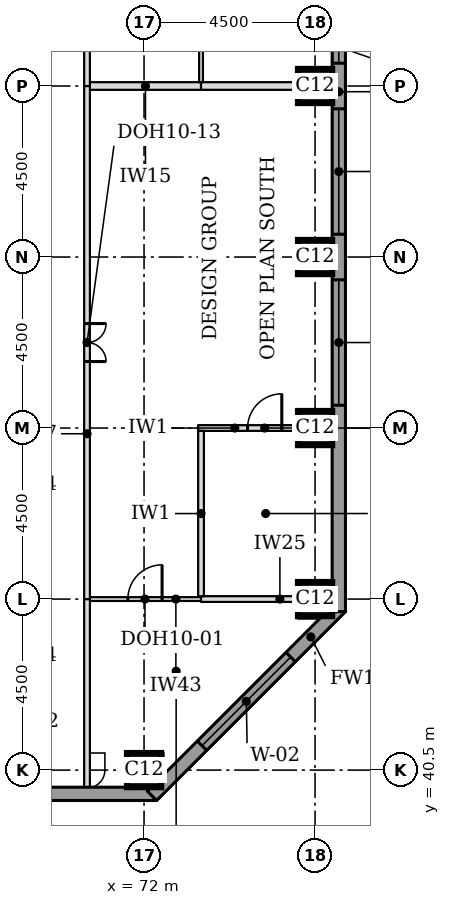
"""IFC4 building model, lengths in metres.
Left out: names, types, materials, properties, quantities, classifications, styles, units other than length and angle.
Written with IfcOpenShell. Run it as: python <this file> out.ifc"""

import sys

from ifc_helpers import new_model, si_unit, direction, frame, frame_2d, origin, origin_2d, place, context, subcontext, project, spatial, rectangle, extrude, element, fill, save


model = new_model("IFC4")
c1 = context("Model", 3, precision=1e-05, world=origin(), true_north=direction((0.0, 1.0)))
c2 = subcontext(c1, "Body", "Model", "MODEL_VIEW")
j1 = project(units=[si_unit("LENGTHUNIT", "METRE"), si_unit("PLANEANGLEUNIT", "RADIAN")], contexts=[c1])
p1 = place(None, origin())
s1 = spatial("IfcSite", under=j1, at=p1, CompositionType="ELEMENT")
p2 = place(p1, origin())
s2 = spatial("IfcBuilding", under=s1, at=p2, CompositionType="ELEMENT")
p3 = place(p2, frame((0.0, 0.0, 226.7)))
s3 = spatial("IfcBuildingStorey", under=s2, at=p3, CompositionType="ELEMENT", Elevation=226.7)
for number, where, z_axis, x_axis in (
    (1, (72.0, 40.5, 0.0), (0.0, 0.0, 1.0), (1.0, 0.0, 0.0)),
    (2, (76.5, 45.0, 0.0), (0.0, 0.0, 1.0), (1.0, 0.0, 0.0)),
    (3, (76.5, 49.5, 0.0), (0.0, 0.0, 1.0), (1.0, 0.0, 0.0)),
    (4, (76.5, 54.0, 0.0), (0.0, 0.0, 1.0), (1.0, 0.0, 0.0)),
    (5, (76.5, 58.5, 0.0), (0.0, 0.0, 1.0), (1.0, 0.0, 0.0)),
):
    element("IfcColumn", number, at=place(p3, frame(where, z_axis=z_axis, x_axis=x_axis)), inside=s3, PredefinedType="COLUMN", context=c2, shape_type="SweptSolid", body=[
        extrude(rectangle(XDim=0.9, YDim=0.9, at=origin_2d()), origin(), (0.0, 0.0, 1.0), 3.7),
    ])
p4 = place(p3, frame((36.0, 39.875, 0.0), z_axis=(0.0, 0.0, 1.0), x_axis=(1.0, 0.0, 0.0)))
e6 = element("IfcWall", 6, at=p4, inside=s3, PredefinedType="STANDARD", context=c2, shape_type="SweptSolid", body=[
    extrude(rectangle(XDim=36.331, YDim=0.35, at=frame_2d((18.166, 0.0))), origin(), (0.0, 0.0, 1.0), 3.525),
])
p5 = place(p4, frame((5.1, 0.0, 0.9)))
e7 = element("IfcOpeningElement", 7, at=p5, cuts=e6, PredefinedType="OPENING", context=c2, shape_type="SweptSolid", body=[
    extrude(rectangle(XDim=3.3, YDim=1.9, at=frame_2d((1.65, 0.95))), frame((0.0, 0.185, 0.0), z_axis=(0.0, -1.0, 0.0), x_axis=(1.0, 0.0, 0.0)), (0.0, 0.0, 1.0), 0.37),
])
p6 = place(p4, frame((9.6, 0.0, 0.9)))
e8 = element("IfcOpeningElement", 8, at=p6, cuts=e6, PredefinedType="OPENING", context=c2, shape_type="SweptSolid", body=[
    extrude(rectangle(XDim=3.3, YDim=1.9, at=frame_2d((1.65, 0.95))), frame((0.0, 0.185, 0.0), z_axis=(0.0, -1.0, 0.0), x_axis=(1.0, 0.0, 0.0)), (0.0, 0.0, 1.0), 0.37),
])
p7 = place(p4, frame((14.1, 0.0, 0.9)))
e9 = element("IfcOpeningElement", 9, at=p7, cuts=e6, PredefinedType="OPENING", context=c2, shape_type="SweptSolid", body=[
    extrude(rectangle(XDim=3.3, YDim=1.9, at=frame_2d((1.65, 0.95))), frame((0.0, 0.185, 0.0), z_axis=(0.0, -1.0, 0.0), x_axis=(1.0, 0.0, 0.0)), (0.0, 0.0, 1.0), 0.37),
])
p8 = place(p4, frame((18.6, 0.0, 0.9)))
e10 = element("IfcOpeningElement", 10, at=p8, cuts=e6, PredefinedType="OPENING", context=c2, shape_type="SweptSolid", body=[
    extrude(rectangle(XDim=3.3, YDim=1.9, at=frame_2d((1.65, 0.95))), frame((0.0, 0.185, 0.0), z_axis=(0.0, -1.0, 0.0), x_axis=(1.0, 0.0, 0.0)), (0.0, 0.0, 1.0), 0.37),
])
p9 = place(p4, frame((23.1, 0.0, 0.9)))
e11 = element("IfcOpeningElement", 11, at=p9, cuts=e6, PredefinedType="OPENING", context=c2, shape_type="SweptSolid", body=[
    extrude(rectangle(XDim=3.3, YDim=1.9, at=frame_2d((1.65, 0.95))), frame((0.0, 0.185, 0.0), z_axis=(0.0, -1.0, 0.0), x_axis=(1.0, 0.0, 0.0)), (0.0, 0.0, 1.0), 0.37),
])
p10 = place(p4, frame((27.6, 0.0, 0.9)))
e12 = element("IfcOpeningElement", 12, at=p10, cuts=e6, PredefinedType="OPENING", context=c2, shape_type="SweptSolid", body=[
    extrude(rectangle(XDim=3.3, YDim=1.9, at=frame_2d((1.65, 0.95))), frame((0.0, 0.185, 0.0), z_axis=(0.0, -1.0, 0.0), x_axis=(1.0, 0.0, 0.0)), (0.0, 0.0, 1.0), 0.37),
])
p11 = place(p3, frame((72.208, 39.824, 0.0), z_axis=(0.0, 0.0, 1.0), x_axis=(0.707106781187, 0.707106781187, 0.0)))
e13 = element("IfcWall", 13, at=p11, inside=s3, PredefinedType="STANDARD", context=c2, shape_type="SweptSolid", body=[
    extrude(rectangle(XDim=7.027, YDim=0.35, at=frame_2d((3.513, 0.0))), origin(), (0.0, 0.0, 1.0), 3.525),
])
p12 = place(p11, frame((1.863, 0.0, 0.9)))
e14 = element("IfcOpeningElement", 14, at=p12, cuts=e13, PredefinedType="OPENING", context=c2, shape_type="SweptSolid", body=[
    extrude(rectangle(XDim=3.3, YDim=1.9, at=frame_2d((1.65, 0.95))), frame((0.0, 0.185, 0.0), z_axis=(0.0, -1.0, 0.0), x_axis=(1.0, 0.0, 0.0)), (0.0, 0.0, 1.0), 0.37),
])
p13 = place(p3, frame((77.125, 44.669, 0.0), z_axis=(0.0, 0.0, 1.0), x_axis=(0.0, 1.0, 0.0)))
e15 = element("IfcWall", 15, at=p13, inside=s3, PredefinedType="STANDARD", context=c2, shape_type="SweptSolid", body=[
    extrude(rectangle(XDim=32.163, YDim=0.35, at=frame_2d((16.081, 0.0))), origin(), (0.0, 0.0, 1.0), 3.525),
])
p14 = place(p13, frame((5.431, 0.0, 0.9)))
e16 = element("IfcOpeningElement", 16, at=p14, cuts=e15, PredefinedType="OPENING", context=c2, shape_type="SweptSolid", body=[
    extrude(rectangle(XDim=3.3, YDim=1.9, at=frame_2d((1.65, 0.95))), frame((0.0, 0.185, 0.0), z_axis=(0.0, -1.0, 0.0), x_axis=(1.0, 0.0, 0.0)), (0.0, 0.0, 1.0), 0.37),
])
p15 = place(p13, frame((9.931, 0.0, 0.9)))
e17 = element("IfcOpeningElement", 17, at=p15, cuts=e15, PredefinedType="OPENING", context=c2, shape_type="SweptSolid", body=[
    extrude(rectangle(XDim=3.3, YDim=1.9, at=frame_2d((1.65, 0.95))), frame((0.0, 0.185, 0.0), z_axis=(0.0, -1.0, 0.0), x_axis=(1.0, 0.0, 0.0)), (0.0, 0.0, 1.0), 0.37),
])
p16 = place(p13, frame((14.431, 0.0, 0.9)))
e18 = element("IfcOpeningElement", 18, at=p16, cuts=e15, PredefinedType="OPENING", context=c2, shape_type="SweptSolid", body=[
    extrude(rectangle(XDim=3.3, YDim=1.9, at=frame_2d((1.65, 0.95))), frame((0.0, 0.185, 0.0), z_axis=(0.0, -1.0, 0.0), x_axis=(1.0, 0.0, 0.0)), (0.0, 0.0, 1.0), 0.37),
])
p17 = place(p13, frame((18.931, 0.0, 0.9)))
e19 = element("IfcOpeningElement", 19, at=p17, cuts=e15, PredefinedType="OPENING", context=c2, shape_type="SweptSolid", body=[
    extrude(rectangle(XDim=3.3, YDim=1.9, at=frame_2d((1.65, 0.95))), frame((0.0, 0.185, 0.0), z_axis=(0.0, -1.0, 0.0), x_axis=(1.0, 0.0, 0.0)), (0.0, 0.0, 1.0), 0.37),
])
p18 = place(p13, frame((23.431, 0.0, 0.9)))
e20 = element("IfcOpeningElement", 20, at=p18, cuts=e15, PredefinedType="OPENING", context=c2, shape_type="SweptSolid", body=[
    extrude(rectangle(XDim=3.3, YDim=1.9, at=frame_2d((1.65, 0.95))), frame((0.0, 0.185, 0.0), z_axis=(0.0, -1.0, 0.0), x_axis=(1.0, 0.0, 0.0)), (0.0, 0.0, 1.0), 0.37),
])
p19 = place(p3, frame((70.575, 45.0, 0.0), z_axis=(0.0, 0.0, 1.0), x_axis=(1.0, 0.0, 0.0)))
e21 = element("IfcWall", 21, at=p19, inside=s3, PredefinedType="PARTITIONING", context=c2, shape_type="SweptSolid", body=[
    extrude(rectangle(XDim=2.925, YDim=0.1, at=frame_2d((1.462, 0.0))), origin(), (0.0, 0.0, 1.0), 3.096),
])
p20 = place(p19, frame((1.0, 0.0, 0.0)))
e22 = element("IfcOpeningElement", 22, at=p20, cuts=e21, PredefinedType="OPENING", context=c2, shape_type="SweptSolid", body=[
    extrude(rectangle(XDim=0.9, YDim=2.1, at=frame_2d((0.45, 1.05))), frame((0.0, 0.06, 0.0), z_axis=(0.0, -1.0, 0.0), x_axis=(1.0, 0.0, 0.0)), (0.0, 0.0, 1.0), 0.12),
])
p21 = place(p3, frame((73.5, 45.0, 0.0), z_axis=(0.0, 0.0, 1.0), x_axis=(1.0, 0.0, 0.0)))
e23 = element("IfcWall", 23, at=p21, inside=s3, PredefinedType="PARTITIONING", context=c2, shape_type="SweptSolid", body=[
    extrude(rectangle(XDim=2.55, YDim=0.15, at=frame_2d((1.275, 0.0))), origin(), (0.0, 0.0, 1.0), 3.096),
])
p22 = place(p3, frame((73.425, 49.5, 0.0), z_axis=(0.0, 0.0, 1.0), x_axis=(1.0, 0.0, 0.0)))
e24 = element("IfcWall", 24, at=p22, inside=s3, PredefinedType="PARTITIONING", context=c2, shape_type="SweptSolid", body=[
    extrude(rectangle(XDim=3.525, YDim=0.15, at=frame_2d((1.762, 0.0))), origin(), (0.0, 0.0, 1.0), 3.55),
])
p23 = place(p22, frame((1.3, 0.0, 0.0)))
e25 = element("IfcOpeningElement", 25, at=p23, cuts=e24, PredefinedType="OPENING", context=c2, shape_type="SweptSolid", body=[
    extrude(rectangle(XDim=0.9, YDim=2.1, at=frame_2d((0.45, 1.05))), frame((0.0, 0.085, 0.0), z_axis=(0.0, -1.0, 0.0), x_axis=(1.0, 0.0, 0.0)), (0.0, 0.0, 1.0), 0.17),
])
p24 = place(p3, frame((70.575, 58.5, 0.0), z_axis=(0.0, 0.0, 1.0), x_axis=(1.0, 0.0, 0.0)))
e26 = element("IfcWall", 26, at=p24, inside=s3, PredefinedType="PARTITIONING", context=c2, shape_type="SweptSolid", body=[
    extrude(rectangle(XDim=2.925, YDim=0.2, at=frame_2d((1.462, 0.0))), origin(), (0.0, 0.0, 1.0), 3.55),
])
p25 = place(p3, frame((73.5, 58.5, 0.0), z_axis=(0.0, 0.0, 1.0), x_axis=(1.0, 0.0, 0.0)))
e27 = element("IfcWall", 27, at=p25, inside=s3, PredefinedType="PARTITIONING", context=c2, shape_type="SweptSolid", body=[
    extrude(rectangle(XDim=3.45, YDim=0.2, at=frame_2d((1.725, 0.0))), origin(), (0.0, 0.0, 1.0), 3.55),
])
p26 = place(p3, frame((70.5, 40.05, 0.0), z_axis=(0.0, 0.0, 1.0), x_axis=(0.0, 1.0, 0.0)))
e28 = element("IfcWall", 28, at=p26, inside=s3, PredefinedType="PARTITIONING", context=c2, shape_type="SweptSolid", body=[
    extrude(rectangle(XDim=4.95, YDim=0.15, at=frame_2d((2.475, 0.0))), origin(), (0.0, 0.0, 1.0), 3.55),
])
p27 = place(p3, frame((70.5, 45.0, 0.0), z_axis=(0.0, 0.0, 1.0), x_axis=(0.0, 1.0, 0.0)))
e29 = element("IfcWall", 29, at=p27, inside=s3, PredefinedType="PARTITIONING", context=c2, shape_type="SweptSolid", body=[
    extrude(rectangle(XDim=13.5, YDim=0.15, at=frame_2d((6.75, 0.0))), origin(), (0.0, 0.0, 1.0), 3.55),
])
p28 = place(p27, frame((6.25, 0.0, 0.0)))
e30 = element("IfcOpeningElement", 30, at=p28, cuts=e29, PredefinedType="OPENING", context=c2, shape_type="SweptSolid", body=[
    extrude(rectangle(XDim=1.0, YDim=2.1, at=frame_2d((0.5, 1.05))), frame((0.0, 0.085, 0.0), z_axis=(0.0, -1.0, 0.0), x_axis=(1.0, 0.0, 0.0)), (0.0, 0.0, 1.0), 0.17),
])
p29 = place(p3, frame((73.5, 45.075, 0.0), z_axis=(0.0, 0.0, 1.0), x_axis=(0.0, 1.0, 0.0)))
e31 = element("IfcWall", 31, at=p29, inside=s3, PredefinedType="PARTITIONING", context=c2, shape_type="SweptSolid", body=[
    extrude(rectangle(XDim=4.35, YDim=0.15, at=frame_2d((2.175, 0.0))), origin(), (0.0, 0.0, 1.0), 3.55),
])
p30 = place(p3, frame((70.5, 58.5, 0.0), z_axis=(0.0, 0.0, 1.0), x_axis=(0.0, 1.0, 0.0)))
e32 = element("IfcWall", 32, at=p30, inside=s3, PredefinedType="PARTITIONING", context=c2, shape_type="SweptSolid", body=[
    extrude(rectangle(XDim=19.5, YDim=0.15, at=frame_2d((9.75, 0.0))), origin(), (0.0, 0.0, 1.0), 3.55),
])
p31 = place(p30, frame((9.25, 0.0, 0.0)))
e33 = element("IfcOpeningElement", 33, at=p31, cuts=e32, PredefinedType="OPENING", context=c2, shape_type="SweptSolid", body=[
    extrude(rectangle(XDim=1.0, YDim=2.1, at=frame_2d((0.5, 1.05))), frame((0.0, 0.085, 0.0), z_axis=(0.0, -1.0, 0.0), x_axis=(1.0, 0.0, 0.0)), (0.0, 0.0, 1.0), 0.17),
])
p32 = place(p3, frame((73.5, 58.6, 0.0), z_axis=(0.0, 0.0, 1.0), x_axis=(0.0, 1.0, 0.0)))
e34 = element("IfcWall", 34, at=p32, inside=s3, PredefinedType="PARTITIONING", context=c2, shape_type="SweptSolid", body=[
    extrude(rectangle(XDim=4.4, YDim=0.1, at=frame_2d((2.2, 0.0))), origin(), (0.0, 0.0, 1.0), 3.55),
])
p33 = place(p32, frame((1.75, 0.0, 0.0)))
e35 = element("IfcOpeningElement", 35, at=p33, cuts=e34, PredefinedType="OPENING", context=c2, shape_type="SweptSolid", body=[
    extrude(rectangle(XDim=0.9, YDim=2.1, at=frame_2d((0.45, 1.05))), frame((0.0, 0.06, 0.0), z_axis=(0.0, -1.0, 0.0), x_axis=(1.0, 0.0, 0.0)), (0.0, 0.0, 1.0), 0.12),
])
p34 = place(p12, origin())
e36 = element("IfcWindow", 36, at=p34, inside=s3, PartitioningType="SINGLE_PANEL", PredefinedType="WINDOW", context=c2, shape_type="SweptSolid", body=[
    extrude(rectangle(XDim=3.3, YDim=1.9, at=frame_2d((1.65, 0.95))), frame((0.0, 0.085, 0.0), z_axis=(0.0, -1.0, 0.0), x_axis=(1.0, 0.0, 0.0)), (0.0, 0.0, 1.0), 0.06),
])
fill(e14, e36)
p35 = place(p14, origin())
e37 = element("IfcWindow", 37, at=p35, inside=s3, PartitioningType="SINGLE_PANEL", PredefinedType="WINDOW", context=c2, shape_type="SweptSolid", body=[
    extrude(rectangle(XDim=3.3, YDim=1.9, at=frame_2d((1.65, 0.95))), frame((0.0, 0.085, 0.0), z_axis=(0.0, -1.0, 0.0), x_axis=(1.0, 0.0, 0.0)), (0.0, 0.0, 1.0), 0.06),
])
fill(e16, e37)
p36 = place(p15, origin())
e38 = element("IfcWindow", 38, at=p36, inside=s3, PartitioningType="SINGLE_PANEL", PredefinedType="WINDOW", context=c2, shape_type="SweptSolid", body=[
    extrude(rectangle(XDim=3.3, YDim=1.9, at=frame_2d((1.65, 0.95))), frame((0.0, 0.085, 0.0), z_axis=(0.0, -1.0, 0.0), x_axis=(1.0, 0.0, 0.0)), (0.0, 0.0, 1.0), 0.06),
])
fill(e17, e38)
p37 = place(p16, origin())
e39 = element("IfcWindow", 39, at=p37, inside=s3, PartitioningType="SINGLE_PANEL", PredefinedType="WINDOW", context=c2, shape_type="SweptSolid", body=[
    extrude(rectangle(XDim=3.3, YDim=1.9, at=frame_2d((1.65, 0.95))), frame((0.0, 0.085, 0.0), z_axis=(0.0, -1.0, 0.0), x_axis=(1.0, 0.0, 0.0)), (0.0, 0.0, 1.0), 0.06),
])
fill(e18, e39)
p38 = place(p28, frame((1.0, 0.0, 0.0), z_axis=(0.0, 0.0, 1.0), x_axis=(-1.0, 0.0, 0.0)))
e40 = element("IfcDoor", 40, at=p38, inside=s3, OperationType="DOUBLE_DOOR_SINGLE_SWING", PredefinedType="DOOR", context=c2, shape_type="SweptSolid", body=[
    extrude(rectangle(XDim=1.0, YDim=2.1, at=frame_2d((0.5, 1.05))), frame((0.0, 0.025, 0.0), z_axis=(0.0, -1.0, 0.0), x_axis=(1.0, 0.0, 0.0)), (0.0, 0.0, 1.0), 0.05),
])
fill(e30, e40)
p39 = place(p20, origin())
e41 = element("IfcDoor", 41, at=p39, inside=s3, OperationType="SINGLE_SWING_RIGHT", PredefinedType="DOOR", context=c2, shape_type="SweptSolid", body=[
    extrude(rectangle(XDim=0.9, YDim=2.1, at=frame_2d((0.45, 1.05))), frame((0.0, 0.025, 0.0), z_axis=(0.0, -1.0, 0.0), x_axis=(1.0, 0.0, 0.0)), (0.0, 0.0, 1.0), 0.05),
])
fill(e22, e41)
p40 = place(p23, origin())
e42 = element("IfcDoor", 42, at=p40, inside=s3, OperationType="SINGLE_SWING_RIGHT", PredefinedType="DOOR", context=c2, shape_type="SweptSolid", body=[
    extrude(rectangle(XDim=0.9, YDim=2.1, at=frame_2d((0.45, 1.05))), frame((0.0, 0.025, 0.0), z_axis=(0.0, -1.0, 0.0), x_axis=(1.0, 0.0, 0.0)), (0.0, 0.0, 1.0), 0.05),
])
fill(e25, e42)
save(model, sys.argv[1])
